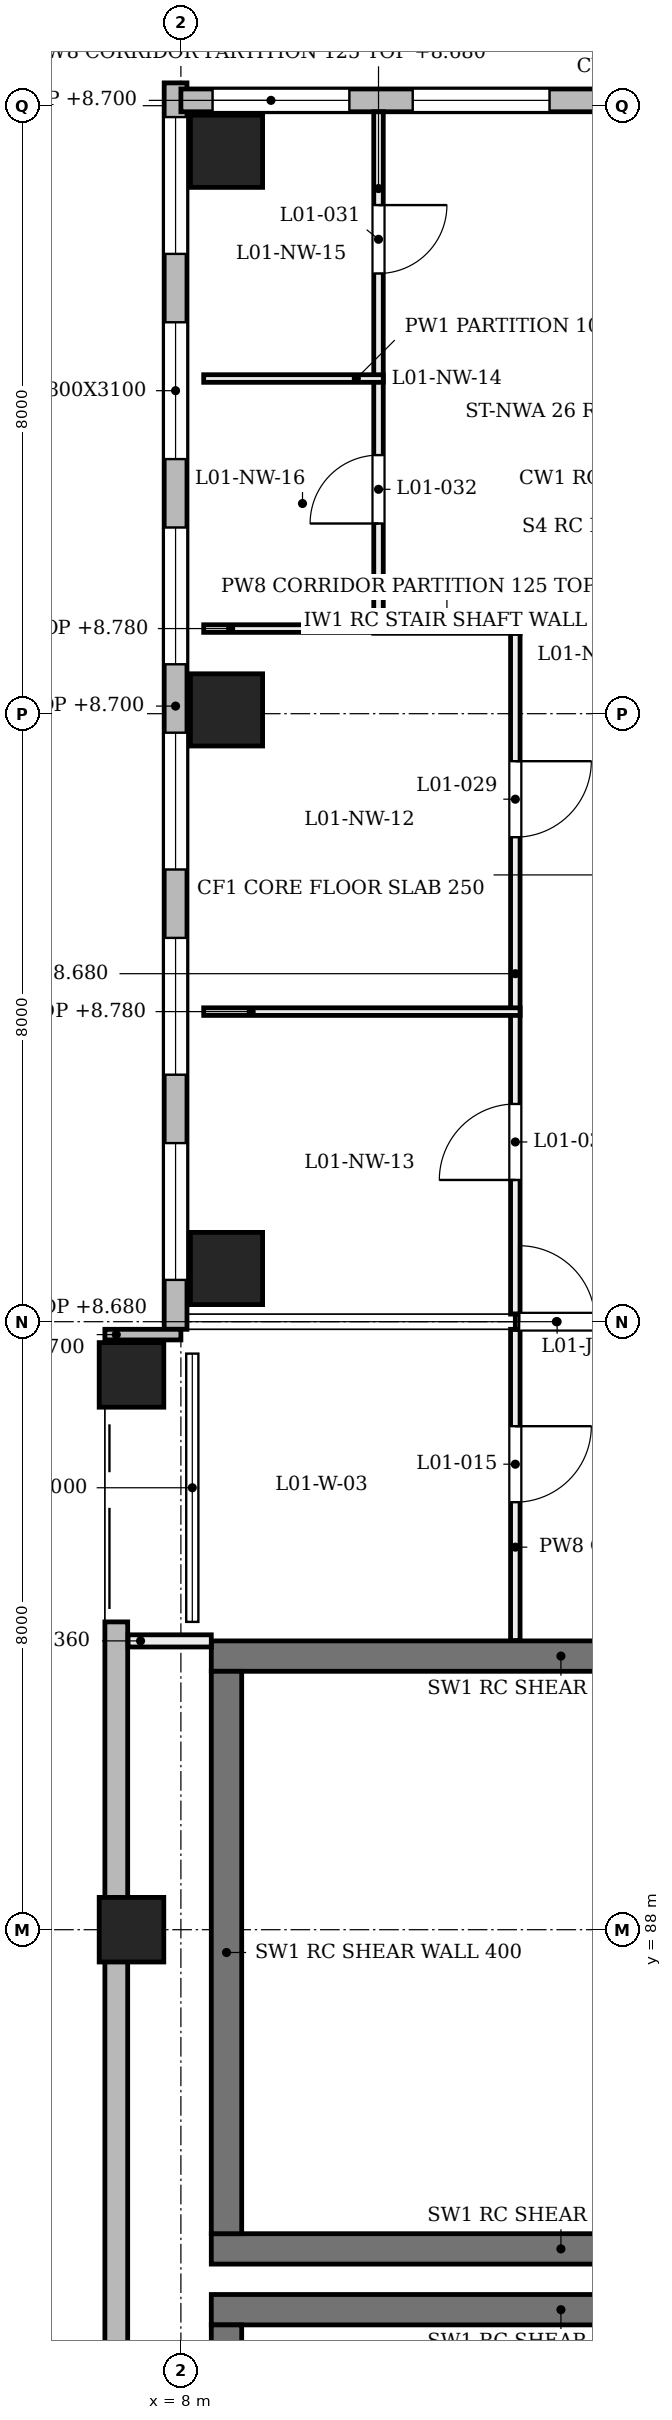
"""IFC4 building model, lengths in metres.
Left out: names, types, materials, properties, quantities, classifications, styles, units other than length and angle.
Written with IfcOpenShell. Run it as: python <this file> out.ifc"""

import sys

from ifc_helpers import new_model, si_unit, direction, frame, frame_2d, origin, origin_2d, place, context, subcontext, project, spatial, rectangle, extrude, element, fill, save


model = new_model("IFC4")
c1 = context("Model", 3, precision=1e-05, world=origin(), true_north=direction((0.0, 1.0)))
c2 = subcontext(c1, "Body", "Model", "MODEL_VIEW")
j1 = project(units=[si_unit("LENGTHUNIT", "METRE"), si_unit("PLANEANGLEUNIT", "RADIAN")], contexts=[c1])
p1 = place(None, origin())
s1 = spatial("IfcSite", under=j1, at=p1, CompositionType="ELEMENT")
p2 = place(p1, origin())
s2 = spatial("IfcBuilding", under=s1, at=p2, CompositionType="ELEMENT")
p3 = place(p2, frame((0.0, 0.0, 4.8)))
s3 = spatial("IfcBuildingStorey", under=s2, at=p3, CompositionType="ELEMENT", Elevation=4.8)
p4 = place(p3, frame((8.4, 83.0, 0.0), z_axis=(0.0, 0.0, 1.0), x_axis=(1.0, 0.0, 0.0)))
e1 = element("IfcWall", 1, at=p4, inside=s3, PredefinedType="SHEAR", context=c2, shape_type="SweptSolid", body=[
    extrude(rectangle(XDim=9.2, YDim=0.4, at=frame_2d((4.6, 0.0))), origin(), (0.0, 0.0, 1.0), 4.58),
])
p5 = place(p3, frame((8.6, 75.8, 0.0), z_axis=(0.0, 0.0, 1.0), x_axis=(0.0, 1.0, 0.0)))
e2 = element("IfcWall", 2, at=p5, inside=s3, PredefinedType="SHEAR", context=c2, shape_type="SweptSolid", body=[
    extrude(rectangle(XDim=7.0, YDim=0.4, at=frame_2d((3.5, 0.0))), origin(), (0.0, 0.0, 1.0), 4.58),
])
for number, where, z_axis, x_axis in (
    (3, (8.4, 83.8, 0.0), (0.0, 0.0, 1.0), (1.0, 0.0, 0.0)),
    (4, (8.4, 91.6, 0.0), (0.0, 0.0, 1.0), (1.0, 0.0, 0.0)),
):
    element("IfcWall", number, at=place(p3, frame(where, z_axis=z_axis, x_axis=x_axis)), inside=s3, PredefinedType="SHEAR", context=c2, shape_type="SweptSolid", body=[
        extrude(rectangle(XDim=9.2, YDim=0.4, at=frame_2d((4.6, 0.0))), origin(), (0.0, 0.0, 1.0), 4.58),
    ])
p6 = place(p3, frame((8.6, 84.0, 0.0), z_axis=(0.0, 0.0, 1.0), x_axis=(0.0, 1.0, 0.0)))
e5 = element("IfcWall", 5, at=p6, inside=s3, PredefinedType="SHEAR", context=c2, shape_type="SweptSolid", body=[
    extrude(rectangle(XDim=7.4, YDim=0.4, at=frame_2d((3.7, 0.0))), origin(), (0.0, 0.0, 1.0), 4.58),
])
for number, where, z_axis, x_axis in (
    (6, (8.6, 96.7, 0.0), (0.0, 0.0, 1.0), (1.0, 0.0, 0.0)),
    (7, (8.6, 104.05, 0.0), (0.0, 0.0, 1.0), (1.0, 0.0, 0.0)),
    (8, (8.6, 111.4, 0.0), (0.0, 0.0, 1.0), (1.0, 0.0, 0.0)),
):
    element("IfcColumn", number, at=place(p3, frame(where, z_axis=z_axis, x_axis=x_axis)), inside=s3, PredefinedType="COLUMN", context=c2, shape_type="SweptSolid", body=[
        extrude(rectangle(XDim=0.95, YDim=0.95, at=origin_2d()), origin(), (0.0, 0.0, 1.0), 4.8),
    ])
for number, where, z_axis, x_axis in (
    (9, (7.6, 88.0, 0.0), (-0.204, 0.0, 0.979), (0.0, -1.0, 0.0)),
    (10, (7.6, 95.3, 0.0), (-0.204, 0.0, 0.979), (0.0, -1.0, 0.0)),
):
    element("IfcColumn", number, at=place(p3, frame(where, z_axis=z_axis, x_axis=x_axis)), inside=s3, PredefinedType="COLUMN", context=c2, shape_type="SweptSolid", body=[
        extrude(rectangle(XDim=0.85, YDim=0.85, at=origin_2d()), origin(), (0.0, 0.0, 1.0), 4.903),
    ])
p7 = place(p3, frame((7.15, 67.95, 0.0), z_axis=(0.0, 0.0, 1.0), x_axis=(0.0, 1.0, 0.0)))
e11 = element("IfcWall", 11, at=p7, inside=s3, PredefinedType="SOLIDWALL", context=c2, shape_type="SweptSolid", body=[
    extrude(rectangle(XDim=24.1, YDim=0.3, at=frame_2d((12.05, 0.0))), origin(), (0.0, 0.0, 1.0), 3.9),
])
p8 = place(p3, frame((7.93, 95.9, 0.0), z_axis=(0.0, 0.0, 1.0), x_axis=(0.0, 1.0, 0.0)))
e12 = element("IfcWall", 12, at=p8, inside=s3, PredefinedType="SOLIDWALL", context=c2, shape_type="SweptSolid", body=[
    extrude(rectangle(XDim=16.4, YDim=0.3, at=frame_2d((8.2, 0.0))), origin(), (0.0, 0.0, 1.0), 3.9),
])
p9 = place(p8, frame((0.65, 0.0, 0.75)))
e13 = element("IfcOpeningElement", 13, at=p9, cuts=e12, PredefinedType="OPENING", context=c2, shape_type="SweptSolid", body=[
    extrude(rectangle(XDim=1.8, YDim=3.1, at=frame_2d((0.9, 1.55))), frame((0.0, 0.16, 0.0), z_axis=(0.0, -1.0, 0.0), x_axis=(1.0, 0.0, 0.0)), (0.0, 0.0, 1.0), 0.32),
])
p10 = place(p8, frame((3.35, 0.0, 0.75)))
e14 = element("IfcOpeningElement", 14, at=p10, cuts=e12, PredefinedType="OPENING", context=c2, shape_type="SweptSolid", body=[
    extrude(rectangle(XDim=1.8, YDim=3.1, at=frame_2d((0.9, 1.55))), frame((0.0, 0.16, 0.0), z_axis=(0.0, -1.0, 0.0), x_axis=(1.0, 0.0, 0.0)), (0.0, 0.0, 1.0), 0.32),
])
p11 = place(p8, frame((6.05, 0.0, 0.75)))
e15 = element("IfcOpeningElement", 15, at=p11, cuts=e12, PredefinedType="OPENING", context=c2, shape_type="SweptSolid", body=[
    extrude(rectangle(XDim=1.8, YDim=3.1, at=frame_2d((0.9, 1.55))), frame((0.0, 0.16, 0.0), z_axis=(0.0, -1.0, 0.0), x_axis=(1.0, 0.0, 0.0)), (0.0, 0.0, 1.0), 0.32),
])
p12 = place(p8, frame((8.75, 0.0, 0.75)))
e16 = element("IfcOpeningElement", 16, at=p12, cuts=e12, PredefinedType="OPENING", context=c2, shape_type="SweptSolid", body=[
    extrude(rectangle(XDim=1.8, YDim=3.1, at=frame_2d((0.9, 1.55))), frame((0.0, 0.16, 0.0), z_axis=(0.0, -1.0, 0.0), x_axis=(1.0, 0.0, 0.0)), (0.0, 0.0, 1.0), 0.32),
])
p13 = place(p8, frame((11.45, 0.0, 0.75)))
e17 = element("IfcOpeningElement", 17, at=p13, cuts=e12, PredefinedType="OPENING", context=c2, shape_type="SweptSolid", body=[
    extrude(rectangle(XDim=1.8, YDim=3.1, at=frame_2d((0.9, 1.55))), frame((0.0, 0.16, 0.0), z_axis=(0.0, -1.0, 0.0), x_axis=(1.0, 0.0, 0.0)), (0.0, 0.0, 1.0), 0.32),
])
p14 = place(p8, frame((14.15, 0.0, 0.75)))
e18 = element("IfcOpeningElement", 18, at=p14, cuts=e12, PredefinedType="OPENING", context=c2, shape_type="SweptSolid", body=[
    extrude(rectangle(XDim=1.8, YDim=3.1, at=frame_2d((0.9, 1.55))), frame((0.0, 0.16, 0.0), z_axis=(0.0, -1.0, 0.0), x_axis=(1.0, 0.0, 0.0)), (0.0, 0.0, 1.0), 0.32),
])
p15 = place(p3, frame((8.0, 112.07, 0.0), z_axis=(0.0, 0.0, 1.0), x_axis=(1.0, 0.0, 0.0)))
e19 = element("IfcWall", 19, at=p15, inside=s3, PredefinedType="SOLIDWALL", context=c2, shape_type="SweptSolid", body=[
    extrude(rectangle(XDim=7.9, YDim=0.3, at=frame_2d((3.95, 0.0))), origin(), (0.0, 0.0, 1.0), 3.9),
])
p16 = place(p15, frame((0.417, 0.0, 0.75)))
e20 = element("IfcOpeningElement", 20, at=p16, cuts=e19, PredefinedType="OPENING", context=c2, shape_type="SweptSolid", body=[
    extrude(rectangle(XDim=1.8, YDim=3.1, at=frame_2d((0.9, 1.55))), frame((0.0, 0.16, 0.0), z_axis=(0.0, -1.0, 0.0), x_axis=(1.0, 0.0, 0.0)), (0.0, 0.0, 1.0), 0.32),
])
p17 = place(p15, frame((3.05, 0.0, 0.75)))
e21 = element("IfcOpeningElement", 21, at=p17, cuts=e19, PredefinedType="OPENING", context=c2, shape_type="SweptSolid", body=[
    extrude(rectangle(XDim=1.8, YDim=3.1, at=frame_2d((0.9, 1.55))), frame((0.0, 0.16, 0.0), z_axis=(0.0, -1.0, 0.0), x_axis=(1.0, 0.0, 0.0)), (0.0, 0.0, 1.0), 0.32),
])
p18 = place(p15, frame((5.683, 0.0, 0.75)))
e22 = element("IfcOpeningElement", 22, at=p18, cuts=e19, PredefinedType="OPENING", context=c2, shape_type="SweptSolid", body=[
    extrude(rectangle(XDim=1.8, YDim=3.1, at=frame_2d((0.9, 1.55))), frame((0.0, 0.16, 0.0), z_axis=(0.0, -1.0, 0.0), x_axis=(1.0, 0.0, 0.0)), (0.0, 0.0, 1.0), 0.32),
])
p19 = place(p3, frame((7.0, 95.83, 0.0), z_axis=(0.0, 0.0, 1.0), x_axis=(1.0, 0.0, 0.0)))
e23 = element("IfcWall", 23, at=p19, inside=s3, PredefinedType="SOLIDWALL", context=c2, shape_type="SweptSolid", body=[
    extrude(rectangle(XDim=1.0, YDim=0.14, at=frame_2d((0.5, 0.0))), origin(), (0.0, 0.0, 1.0), 3.9),
])
p20 = place(p3, frame((12.4, 91.805, 0.0), z_axis=(0.0, 0.0, 1.0), x_axis=(0.0, 1.0, 0.0)))
e24 = element("IfcWall", 24, at=p20, inside=s3, PredefinedType="PARTITIONING", context=c2, shape_type="SweptSolid", body=[
    extrude(rectangle(XDim=4.095, YDim=0.125, at=frame_2d((2.047, 0.0))), origin(), (0.0, 0.0, 1.0), 3.88),
])
p21 = place(p20, frame((1.82, 0.0, 0.0)))
e25 = element("IfcOpeningElement", 25, at=p21, cuts=e24, PredefinedType="OPENING", context=c2, shape_type="SweptSolid", body=[
    extrude(rectangle(XDim=1.0, YDim=2.1, at=frame_2d((0.5, 1.05))), frame((0.0, 0.073, 0.0), z_axis=(0.0, -1.0, 0.0), x_axis=(1.0, 0.0, 0.0)), (0.0, 0.0, 1.0), 0.145),
])
p22 = place(p3, frame((12.4, 96.1, 0.0), z_axis=(0.0, 0.0, 1.0), x_axis=(0.0, 1.0, 0.0)))
e26 = element("IfcWall", 26, at=p22, inside=s3, PredefinedType="PARTITIONING", context=c2, shape_type="SweptSolid", body=[
    extrude(rectangle(XDim=8.958, YDim=0.125, at=frame_2d((4.479, 0.0))), origin(), (0.0, 0.0, 1.0), 3.88),
])
p23 = place(p22, frame((6.275, 0.0, 0.0)))
e27 = element("IfcOpeningElement", 27, at=p23, cuts=e26, PredefinedType="OPENING", context=c2, shape_type="SweptSolid", body=[
    extrude(rectangle(XDim=1.0, YDim=2.1, at=frame_2d((0.5, 1.05))), frame((0.0, 0.073, 0.0), z_axis=(0.0, -1.0, 0.0), x_axis=(1.0, 0.0, 0.0)), (0.0, 0.0, 1.0), 0.145),
])
p24 = place(p22, frame((1.765, 0.0, 0.0)))
e28 = element("IfcOpeningElement", 28, at=p24, cuts=e26, PredefinedType="OPENING", context=c2, shape_type="SweptSolid", body=[
    extrude(rectangle(XDim=1.0, YDim=2.1, at=frame_2d((0.5, 1.05))), frame((0.0, 0.073, 0.0), z_axis=(0.0, -1.0, 0.0), x_axis=(1.0, 0.0, 0.0)), (0.0, 0.0, 1.0), 0.145),
])
p25 = place(p3, frame((7.305, 91.8, 0.0), z_axis=(0.0, 0.0, 1.0), x_axis=(1.0, 0.0, 0.0)))
e29 = element("IfcWall", 29, at=p25, inside=s3, PredefinedType="PARTITIONING", context=c2, shape_type="SweptSolid", body=[
    extrude(rectangle(XDim=1.095, YDim=0.16, at=frame_2d((0.547, 0.0))), origin(), (0.0, 0.0, 1.0), 4.56),
])
p26 = place(p3, frame((10.6, 105.183, 0.0), z_axis=(0.0, 0.0, 1.0), x_axis=(0.0, 1.0, 0.0)))
e30 = element("IfcWall", 30, at=p26, inside=s3, PredefinedType="PARTITIONING", context=c2, shape_type="SweptSolid", body=[
    extrude(rectangle(XDim=6.737, YDim=0.125, at=frame_2d((3.369, 0.0))), origin(), (0.0, 0.0, 1.0), 3.88),
])
p27 = place(p26, frame((4.609, 0.0, 0.0)))
e31 = element("IfcOpeningElement", 31, at=p27, cuts=e30, PredefinedType="OPENING", context=c2, shape_type="SweptSolid", body=[
    extrude(rectangle(XDim=0.9, YDim=2.1, at=frame_2d((0.45, 1.05))), frame((0.0, 0.073, 0.0), z_axis=(0.0, -1.0, 0.0), x_axis=(1.0, 0.0, 0.0)), (0.0, 0.0, 1.0), 0.145),
])
p28 = place(p26, frame((1.319, 0.0, 0.0)))
e32 = element("IfcOpeningElement", 32, at=p28, cuts=e30, PredefinedType="OPENING", context=c2, shape_type="SweptSolid", body=[
    extrude(rectangle(XDim=0.9, YDim=2.1, at=frame_2d((0.45, 1.05))), frame((0.0, 0.073, 0.0), z_axis=(0.0, -1.0, 0.0), x_axis=(1.0, 0.0, 0.0)), (0.0, 0.0, 1.0), 0.145),
])
p29 = place(p3, frame((8.3, 100.08, 0.0), z_axis=(0.0, 0.0, 1.0), x_axis=(1.0, 0.0, 0.0)))
e33 = element("IfcWall", 33, at=p29, inside=s3, PredefinedType="PARTITIONING", context=c2, shape_type="SweptSolid", body=[
    extrude(rectangle(XDim=4.162, YDim=0.1, at=frame_2d((2.081, 0.0))), origin(), (0.0, 0.0, 1.0), 3.98),
])
p30 = place(p3, frame((8.3, 105.12, 0.0), z_axis=(0.0, 0.0, 1.0), x_axis=(1.0, 0.0, 0.0)))
e34 = element("IfcWall", 34, at=p30, inside=s3, PredefinedType="PARTITIONING", context=c2, shape_type="SweptSolid", body=[
    extrude(rectangle(XDim=2.363, YDim=0.1, at=frame_2d((1.181, 0.0))), origin(), (0.0, 0.0, 1.0), 3.98),
])
p31 = place(p3, frame((10.538, 105.12, 0.0), z_axis=(0.0, 0.0, 1.0), x_axis=(1.0, 0.0, 0.0)))
e35 = element("IfcWall", 35, at=p31, inside=s3, PredefinedType="PARTITIONING", context=c2, shape_type="SweptSolid", body=[
    extrude(rectangle(XDim=1.925, YDim=0.125, at=frame_2d((0.962, 0.0))), origin(), (0.0, 0.0, 1.0), 4.56),
])
p32 = place(p3, frame((8.3, 108.41, 0.0), z_axis=(0.0, 0.0, 1.0), x_axis=(1.0, 0.0, 0.0)))
e36 = element("IfcWall", 36, at=p32, inside=s3, PredefinedType="PARTITIONING", context=c2, shape_type="SweptSolid", body=[
    extrude(rectangle(XDim=2.363, YDim=0.1, at=frame_2d((1.181, 0.0))), origin(), (0.0, 0.0, 1.0), 3.98),
])
p33 = place(p3, frame((12.4, 96.0, 0.0), z_axis=(0.0, 0.0, 1.0), x_axis=(1.0, 0.0, 0.0)))
e37 = element("IfcWall", 37, at=p33, inside=s3, PredefinedType="PARTITIONING", context=c2, shape_type="SweptSolid", body=[
    extrude(rectangle(XDim=3.6, YDim=0.2, at=frame_2d((1.8, 0.0))), origin(), (0.0, 0.0, 1.0), 3.88),
])
p34 = place(p33, frame((0.05, 0.0, 0.0)))
e38 = element("IfcOpeningElement", 38, at=p34, cuts=e37, PredefinedType="OPENING", context=c2, shape_type="SweptSolid", body=[
    extrude(rectangle(XDim=1.0, YDim=2.1, at=frame_2d((0.5, 1.05))), frame((0.0, 0.11, 0.0), z_axis=(0.0, -1.0, 0.0), x_axis=(1.0, 0.0, 0.0)), (0.0, 0.0, 1.0), 0.22),
])
p35 = place(p2, origin())
s4 = spatial("IfcBuildingStorey", under=s2, at=p35, CompositionType="ELEMENT", Elevation=0.0)
p36 = place(p35, frame((9.0, 75.8, 0.0), z_axis=(0.0, 0.0, 1.0), x_axis=(0.0, 1.0, 0.0)))
e39 = element("IfcWall", 39, at=p36, inside=s4, PredefinedType="PARTITIONING", context=c2, shape_type="SweptSolid", body=[
    extrude(rectangle(XDim=7.0, YDim=0.3, at=frame_2d((3.5, 0.0))), origin(), (0.0, 0.0, 1.0), 6.95),
])
p37 = place(p35, frame((9.0, 84.0, 0.0), z_axis=(0.0, 0.0, 1.0), x_axis=(0.0, 1.0, 0.0)))
e40 = element("IfcWall", 40, at=p37, inside=s4, PredefinedType="PARTITIONING", context=c2, shape_type="SweptSolid", body=[
    extrude(rectangle(XDim=7.4, YDim=0.3, at=frame_2d((3.7, 0.0))), origin(), (0.0, 0.0, 1.0), 6.95),
])
p38 = place(p9, origin())
e41 = element("IfcWindow", 41, at=p38, inside=s3, PartitioningType="SINGLE_PANEL", PredefinedType="WINDOW", context=c2, shape_type="SweptSolid", body=[
    extrude(rectangle(XDim=1.8, YDim=3.1, at=frame_2d((0.9, 1.55))), frame((0.0, 0.03, 0.0), z_axis=(0.0, -1.0, 0.0), x_axis=(1.0, 0.0, 0.0)), (0.0, 0.0, 1.0), 0.06),
])
fill(e13, e41)
p39 = place(p10, origin())
e42 = element("IfcWindow", 42, at=p39, inside=s3, PartitioningType="SINGLE_PANEL", PredefinedType="WINDOW", context=c2, shape_type="SweptSolid", body=[
    extrude(rectangle(XDim=1.8, YDim=3.1, at=frame_2d((0.9, 1.55))), frame((0.0, 0.03, 0.0), z_axis=(0.0, -1.0, 0.0), x_axis=(1.0, 0.0, 0.0)), (0.0, 0.0, 1.0), 0.06),
])
fill(e14, e42)
p40 = place(p11, origin())
e43 = element("IfcWindow", 43, at=p40, inside=s3, PartitioningType="SINGLE_PANEL", PredefinedType="WINDOW", context=c2, shape_type="SweptSolid", body=[
    extrude(rectangle(XDim=1.8, YDim=3.1, at=frame_2d((0.9, 1.55))), frame((0.0, 0.03, 0.0), z_axis=(0.0, -1.0, 0.0), x_axis=(1.0, 0.0, 0.0)), (0.0, 0.0, 1.0), 0.06),
])
fill(e15, e43)
p41 = place(p12, origin())
e44 = element("IfcWindow", 44, at=p41, inside=s3, PartitioningType="SINGLE_PANEL", PredefinedType="WINDOW", context=c2, shape_type="SweptSolid", body=[
    extrude(rectangle(XDim=1.8, YDim=3.1, at=frame_2d((0.9, 1.55))), frame((0.0, 0.03, 0.0), z_axis=(0.0, -1.0, 0.0), x_axis=(1.0, 0.0, 0.0)), (0.0, 0.0, 1.0), 0.06),
])
fill(e16, e44)
p42 = place(p13, origin())
e45 = element("IfcWindow", 45, at=p42, inside=s3, PartitioningType="SINGLE_PANEL", PredefinedType="WINDOW", context=c2, shape_type="SweptSolid", body=[
    extrude(rectangle(XDim=1.8, YDim=3.1, at=frame_2d((0.9, 1.55))), frame((0.0, 0.03, 0.0), z_axis=(0.0, -1.0, 0.0), x_axis=(1.0, 0.0, 0.0)), (0.0, 0.0, 1.0), 0.06),
])
fill(e17, e45)
p43 = place(p14, origin())
e46 = element("IfcWindow", 46, at=p43, inside=s3, PartitioningType="SINGLE_PANEL", PredefinedType="WINDOW", context=c2, shape_type="SweptSolid", body=[
    extrude(rectangle(XDim=1.8, YDim=3.1, at=frame_2d((0.9, 1.55))), frame((0.0, 0.03, 0.0), z_axis=(0.0, -1.0, 0.0), x_axis=(1.0, 0.0, 0.0)), (0.0, 0.0, 1.0), 0.06),
])
fill(e18, e46)
p44 = place(p16, origin())
e47 = element("IfcWindow", 47, at=p44, inside=s3, PartitioningType="SINGLE_PANEL", PredefinedType="WINDOW", context=c2, shape_type="SweptSolid", body=[
    extrude(rectangle(XDim=1.8, YDim=3.1, at=frame_2d((0.9, 1.55))), frame((0.0, 0.03, 0.0), z_axis=(0.0, -1.0, 0.0), x_axis=(1.0, 0.0, 0.0)), (0.0, 0.0, 1.0), 0.06),
])
fill(e20, e47)
p45 = place(p17, origin())
e48 = element("IfcWindow", 48, at=p45, inside=s3, PartitioningType="SINGLE_PANEL", PredefinedType="WINDOW", context=c2, shape_type="SweptSolid", body=[
    extrude(rectangle(XDim=1.8, YDim=3.1, at=frame_2d((0.9, 1.55))), frame((0.0, 0.03, 0.0), z_axis=(0.0, -1.0, 0.0), x_axis=(1.0, 0.0, 0.0)), (0.0, 0.0, 1.0), 0.06),
])
fill(e21, e48)
p46 = place(p21, origin())
e49 = element("IfcDoor", 49, at=p46, inside=s3, OperationType="SINGLE_SWING_RIGHT", PredefinedType="DOOR", context=c2, shape_type="SweptSolid", body=[
    extrude(rectangle(XDim=1.0, YDim=2.1, at=frame_2d((0.5, 1.05))), frame((0.0, 0.025, 0.0), z_axis=(0.0, -1.0, 0.0), x_axis=(1.0, 0.0, 0.0)), (0.0, 0.0, 1.0), 0.05),
])
fill(e25, e49)
p47 = place(p23, origin())
e50 = element("IfcDoor", 50, at=p47, inside=s3, OperationType="SINGLE_SWING_RIGHT", PredefinedType="DOOR", context=c2, shape_type="SweptSolid", body=[
    extrude(rectangle(XDim=1.0, YDim=2.1, at=frame_2d((0.5, 1.05))), frame((0.0, 0.025, 0.0), z_axis=(0.0, -1.0, 0.0), x_axis=(1.0, 0.0, 0.0)), (0.0, 0.0, 1.0), 0.05),
])
fill(e27, e50)
p48 = place(p24, origin())
e51 = element("IfcDoor", 51, at=p48, inside=s3, OperationType="SINGLE_SWING_LEFT", PredefinedType="DOOR", context=c2, shape_type="SweptSolid", body=[
    extrude(rectangle(XDim=1.0, YDim=2.1, at=frame_2d((0.5, 1.05))), frame((0.0, 0.025, 0.0), z_axis=(0.0, -1.0, 0.0), x_axis=(1.0, 0.0, 0.0)), (0.0, 0.0, 1.0), 0.05),
])
fill(e28, e51)
p49 = place(p27, origin())
e52 = element("IfcDoor", 52, at=p49, inside=s3, OperationType="SINGLE_SWING_RIGHT", PredefinedType="DOOR", context=c2, shape_type="SweptSolid", body=[
    extrude(rectangle(XDim=0.9, YDim=2.1, at=frame_2d((0.45, 1.05))), frame((0.0, 0.025, 0.0), z_axis=(0.0, -1.0, 0.0), x_axis=(1.0, 0.0, 0.0)), (0.0, 0.0, 1.0), 0.05),
])
fill(e31, e52)
p50 = place(p28, origin())
e53 = element("IfcDoor", 53, at=p50, inside=s3, OperationType="SINGLE_SWING_LEFT", PredefinedType="DOOR", context=c2, shape_type="SweptSolid", body=[
    extrude(rectangle(XDim=0.9, YDim=2.1, at=frame_2d((0.45, 1.05))), frame((0.0, 0.025, 0.0), z_axis=(0.0, -1.0, 0.0), x_axis=(1.0, 0.0, 0.0)), (0.0, 0.0, 1.0), 0.05),
])
fill(e32, e53)
p51 = place(p34, origin())
e54 = element("IfcDoor", 54, at=p51, inside=s3, OperationType="SINGLE_SWING_LEFT", PredefinedType="DOOR", context=c2, shape_type="SweptSolid", body=[
    extrude(rectangle(XDim=1.0, YDim=2.1, at=frame_2d((0.5, 1.05))), frame((0.0, 0.025, 0.0), z_axis=(0.0, -1.0, 0.0), x_axis=(1.0, 0.0, 0.0)), (0.0, 0.0, 1.0), 0.05),
])
fill(e38, e54)
save(model, sys.argv[1])
